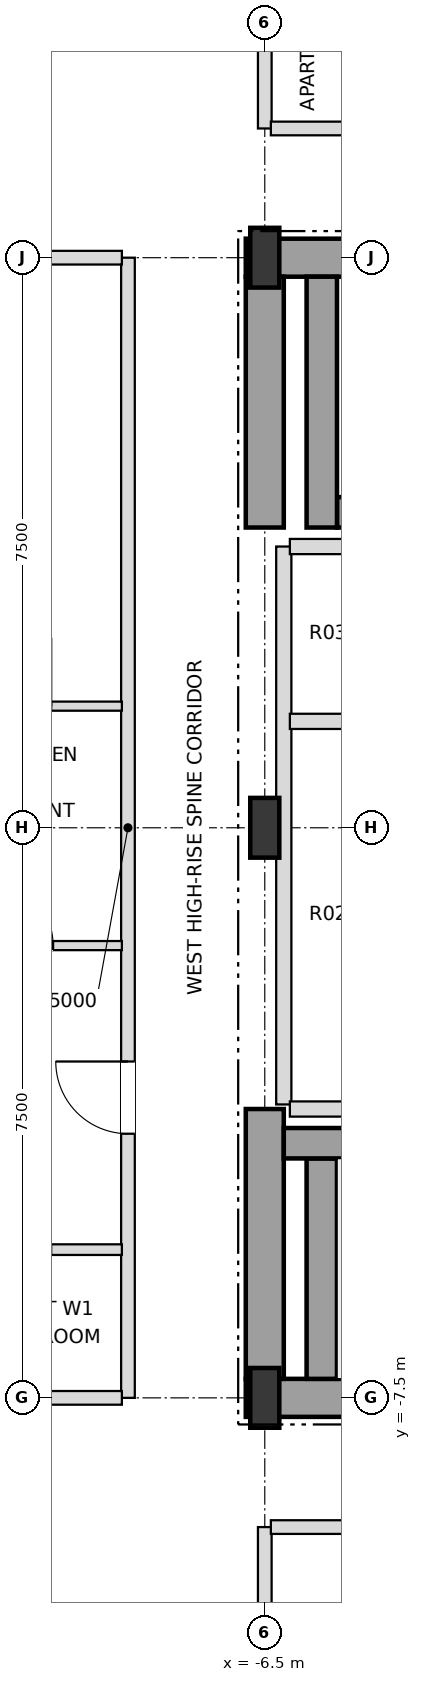
"""IFC4 building model, lengths in metres.
Left out: names, types, materials, properties, quantities, classifications, styles, units other than length and angle.
Written with IfcOpenShell. Run it as: python <this file> out.ifc"""

import sys

from ifc_helpers import new_model, si_unit, direction, frame, frame_2d, origin, origin_2d, place, context, subcontext, project, spatial, rectangle, i_section, extrude, element, fill, save


model = new_model("IFC4")
c1 = context("Model", 3, precision=1e-05, world=origin(), true_north=direction((0.0, 1.0)))
c2 = subcontext(c1, "Body", "Model", "MODEL_VIEW")
j1 = project(units=[si_unit("LENGTHUNIT", "METRE"), si_unit("PLANEANGLEUNIT", "RADIAN")], contexts=[c1])
p1 = place(None, origin())
s1 = spatial("IfcSite", under=j1, at=p1, CompositionType="ELEMENT")
p2 = place(p1, origin())
s2 = spatial("IfcBuilding", under=s1, at=p2, CompositionType="ELEMENT")
p3 = place(p2, frame((0.0, 0.0, 251.1)))
s3 = spatial("IfcBuildingStorey", under=s2, at=p3, CompositionType="ELEMENT", Elevation=251.1)
for number, where, z_axis, x_axis in (
    (1, (-6.5, -7.5, 0.0), (0.0, 0.0, 1.0), (1.0, 0.0, 0.0)),
    (2, (-6.5, 0.0, 0.0), (0.0, 0.0, 1.0), (1.0, 0.0, 0.0)),
    (3, (-6.5, 7.5, 0.0), (0.0, 0.0, 1.0), (1.0, 0.0, 0.0)),
):
    element("IfcColumn", number, at=place(p3, frame(where, z_axis=z_axis, x_axis=x_axis)), inside=s3, PredefinedType="COLUMN", context=c2, shape_type="SweptSolid", body=[
        extrude(i_section(OverallWidth=0.382, OverallDepth=0.786, WebThickness=0.02, FlangeThickness=0.033, at=origin_2d()), origin(), (0.0, 0.0, 1.0), 3.6),
    ])
p4 = place(p3, frame((-6.75, -7.5, 0.0), z_axis=(0.0, 0.0, 1.0), x_axis=(1.0, 0.0, 0.0)))
e4 = element("IfcWall", 4, at=p4, inside=s3, PredefinedType="SHEAR", context=c2, shape_type="SweptSolid", body=[
    extrude(rectangle(XDim=6.75, YDim=0.5, at=frame_2d((3.375, 0.0))), origin(), (0.0, 0.0, 1.0), 3.38),
])
p5 = place(p3, frame((-6.75, 7.5, 0.0), z_axis=(0.0, 0.0, 1.0), x_axis=(1.0, 0.0, 0.0)))
e5 = element("IfcWall", 5, at=p5, inside=s3, PredefinedType="SHEAR", context=c2, shape_type="SweptSolid", body=[
    extrude(rectangle(XDim=6.75, YDim=0.5, at=frame_2d((3.375, 0.0))), origin(), (0.0, 0.0, 1.0), 3.38),
])
p6 = place(p5, frame((1.65, 0.0, 0.0)))
e6 = element("IfcOpeningElement", 6, at=p6, cuts=e5, PredefinedType="OPENING", context=c2, shape_type="SweptSolid", body=[
    extrude(rectangle(XDim=1.05, YDim=2.15, at=frame_2d((0.525, 1.075))), frame((0.0, 0.26, 0.0), z_axis=(0.0, -1.0, 0.0), x_axis=(1.0, 0.0, 0.0)), (0.0, 0.0, 1.0), 0.52),
])
p7 = place(p3, frame((-6.5, -7.25, 0.0), z_axis=(0.0, 0.0, 1.0), x_axis=(0.0, 1.0, 0.0)))
e7 = element("IfcWall", 7, at=p7, inside=s3, PredefinedType="SHEAR", context=c2, shape_type="SweptSolid", body=[
    extrude(rectangle(XDim=3.55, YDim=0.5, at=frame_2d((1.775, 0.0))), origin(), (0.0, 0.0, 1.0), 3.38),
])
p8 = place(p3, frame((-6.5, 3.95, 0.0), z_axis=(0.0, 0.0, 1.0), x_axis=(0.0, 1.0, 0.0)))
e8 = element("IfcWall", 8, at=p8, inside=s3, PredefinedType="SHEAR", context=c2, shape_type="SweptSolid", body=[
    extrude(rectangle(XDim=3.3, YDim=0.5, at=frame_2d((1.65, 0.0))), origin(), (0.0, 0.0, 1.0), 3.38),
])
p9 = place(p3, frame((-5.75, -7.25, 0.0), z_axis=(0.0, 0.0, 1.0), x_axis=(0.0, 1.0, 0.0)))
e9 = element("IfcWall", 9, at=p9, inside=s3, PredefinedType="SHEAR", context=c2, shape_type="SweptSolid", body=[
    extrude(rectangle(XDim=2.9, YDim=0.4, at=frame_2d((1.45, 0.0))), origin(), (0.0, 0.0, 1.0), 3.38),
])
p10 = place(p3, frame((-6.25, -4.15, 0.0), z_axis=(0.0, 0.0, 1.0), x_axis=(1.0, 0.0, 0.0)))
e10 = element("IfcWall", 10, at=p10, inside=s3, PredefinedType="SHEAR", context=c2, shape_type="SweptSolid", body=[
    extrude(rectangle(XDim=7.78, YDim=0.4, at=frame_2d((3.89, 0.0))), origin(), (0.0, 0.0, 1.0), 3.38),
])
p11 = place(p3, frame((-5.55, 4.15, 0.0), z_axis=(0.0, 0.0, 1.0), x_axis=(1.0, 0.0, 0.0)))
e11 = element("IfcWall", 11, at=p11, inside=s3, PredefinedType="SHEAR", context=c2, shape_type="SweptSolid", body=[
    extrude(rectangle(XDim=7.08, YDim=0.4, at=frame_2d((3.54, 0.0))), origin(), (0.0, 0.0, 1.0), 3.38),
])
p12 = place(p3, frame((-5.75, 3.95, 0.0), z_axis=(0.0, 0.0, 1.0), x_axis=(0.0, 1.0, 0.0)))
e12 = element("IfcWall", 12, at=p12, inside=s3, PredefinedType="SHEAR", context=c2, shape_type="SweptSolid", body=[
    extrude(rectangle(XDim=3.3, YDim=0.4, at=frame_2d((1.65, 0.0))), origin(), (0.0, 0.0, 1.0), 3.38),
])
p13 = place(p3, frame((-8.3, -7.5, 0.0), z_axis=(0.0, 0.0, 1.0), x_axis=(0.0, 1.0, 0.0)))
e13 = element("IfcWall", 13, at=p13, inside=s3, PredefinedType="PARTITIONING", context=c2, shape_type="SweptSolid", body=[
    extrude(rectangle(XDim=15.0, YDim=0.18, at=frame_2d((7.5, 0.0))), origin(), (0.0, 0.0, 1.0), 3.38),
])
p14 = place(p13, frame((3.475, 0.0, 0.0)))
e14 = element("IfcOpeningElement", 14, at=p14, cuts=e13, PredefinedType="OPENING", context=c2, shape_type="SweptSolid", body=[
    extrude(rectangle(XDim=0.95, YDim=2.15, at=frame_2d((0.475, 1.075))), frame((0.0, 0.1, 0.0), z_axis=(0.0, -1.0, 0.0), x_axis=(1.0, 0.0, 0.0)), (0.0, 0.0, 1.0), 0.2),
])
for number, where, z_axis, x_axis in (
    (15, (-6.5, -19.9, 0.0), (0.0, 0.0, 1.0), (0.0, 1.0, 0.0)),
    (16, (-6.5, 9.2, 0.0), (0.0, 0.0, 1.0), (0.0, 1.0, 0.0)),
):
    element("IfcWall", number, at=place(p3, frame(where, z_axis=z_axis, x_axis=x_axis)), inside=s3, PredefinedType="PARTITIONING", context=c2, shape_type="SweptSolid", body=[
        extrude(rectangle(XDim=10.7, YDim=0.18, at=frame_2d((5.35, 0.0))), origin(), (0.0, 0.0, 1.0), 2.826),
    ])
p15 = place(p3, frame((-6.25, -3.64, 0.0), z_axis=(0.0, 0.0, 1.0), x_axis=(0.0, 1.0, 0.0)))
e17 = element("IfcWall", 17, at=p15, inside=s3, PredefinedType="SOLIDWALL", context=c2, shape_type="SweptSolid", body=[
    extrude(rectangle(XDim=7.34, YDim=0.2, at=frame_2d((3.67, 0.0))), origin(), (0.0, 0.0, 1.0), 3.38),
])
p16 = place(p3, frame((-6.42, -9.2, 0.0), z_axis=(0.0, 0.0, 1.0), x_axis=(1.0, 0.0, 0.0)))
e18 = element("IfcWall", 18, at=p16, inside=s3, PredefinedType="PARTITIONING", context=c2, shape_type="SweptSolid", body=[
    extrude(rectangle(XDim=5.19, YDim=0.18, at=frame_2d((2.595, 0.0))), origin(), (0.0, 0.0, 1.0), 3.38),
])
p17 = place(p16, frame((2.135, 0.0, 0.0)))
e19 = element("IfcOpeningElement", 19, at=p17, cuts=e18, PredefinedType="OPENING", context=c2, shape_type="SweptSolid", body=[
    extrude(rectangle(XDim=0.95, YDim=2.15, at=frame_2d((0.475, 1.075))), frame((0.0, 0.1, 0.0), z_axis=(0.0, -1.0, 0.0), x_axis=(1.0, 0.0, 0.0)), (0.0, 0.0, 1.0), 0.2),
])
p18 = place(p3, frame((-11.12, -7.5, 0.0), z_axis=(0.0, 0.0, 1.0), x_axis=(1.0, 0.0, 0.0)))
e20 = element("IfcWall", 20, at=p18, inside=s3, PredefinedType="PARTITIONING", context=c2, shape_type="SweptSolid", body=[
    extrude(rectangle(XDim=2.74, YDim=0.18, at=frame_2d((1.37, 0.0))), origin(), (0.0, 0.0, 1.0), 2.826),
])
p19 = place(p3, frame((-11.12, -5.55, 0.0), z_axis=(0.0, 0.0, 1.0), x_axis=(1.0, 0.0, 0.0)))
e21 = element("IfcWall", 21, at=p19, inside=s3, PredefinedType="PARTITIONING", context=c2, shape_type="SweptSolid", body=[
    extrude(rectangle(XDim=2.74, YDim=0.14, at=frame_2d((1.37, 0.0))), origin(), (0.0, 0.0, 1.0), 3.38),
])
p20 = place(p19, frame((0.91, 0.0, 0.0)))
e22 = element("IfcOpeningElement", 22, at=p20, cuts=e21, PredefinedType="OPENING", context=c2, shape_type="SweptSolid", body=[
    extrude(rectangle(XDim=0.9, YDim=2.1, at=frame_2d((0.45, 1.05))), frame((0.0, 0.08, 0.0), z_axis=(0.0, -1.0, 0.0), x_axis=(1.0, 0.0, 0.0)), (0.0, 0.0, 1.0), 0.16),
])
p21 = place(p3, frame((-6.17, -3.7, 0.0), z_axis=(0.0, 0.0, 1.0), x_axis=(1.0, 0.0, 0.0)))
e23 = element("IfcWall", 23, at=p21, inside=s3, PredefinedType="SOLIDWALL", context=c2, shape_type="SweptSolid", body=[
    extrude(rectangle(XDim=1.94, YDim=0.2, at=frame_2d((0.97, 0.0))), origin(), (0.0, 0.0, 1.0), 3.38),
])
p22 = place(p3, frame((-11.12, -1.55, 0.0), z_axis=(0.0, 0.0, 1.0), x_axis=(1.0, 0.0, 0.0)))
e24 = element("IfcWall", 24, at=p22, inside=s3, PredefinedType="PARTITIONING", context=c2, shape_type="SweptSolid", body=[
    extrude(rectangle(XDim=2.74, YDim=0.12, at=frame_2d((1.37, 0.0))), origin(), (0.0, 0.0, 1.0), 3.38),
])
p23 = place(p22, frame((0.885, 0.0, 0.0)))
e25 = element("IfcOpeningElement", 25, at=p23, cuts=e24, PredefinedType="OPENING", context=c2, shape_type="SweptSolid", body=[
    extrude(rectangle(XDim=0.95, YDim=2.1, at=frame_2d((0.475, 1.05))), frame((0.0, 0.07, 0.0), z_axis=(0.0, -1.0, 0.0), x_axis=(1.0, 0.0, 0.0)), (0.0, 0.0, 1.0), 0.14),
])
p24 = place(p3, frame((-6.17, 1.4, 0.0), z_axis=(0.0, 0.0, 1.0), x_axis=(1.0, 0.0, 0.0)))
e26 = element("IfcWall", 26, at=p24, inside=s3, PredefinedType="SOLIDWALL", context=c2, shape_type="SweptSolid", body=[
    extrude(rectangle(XDim=1.94, YDim=0.2, at=frame_2d((0.97, 0.0))), origin(), (0.0, 0.0, 1.0), 3.38),
])
p25 = place(p3, frame((-11.12, 1.6, 0.0), z_axis=(0.0, 0.0, 1.0), x_axis=(1.0, 0.0, 0.0)))
e27 = element("IfcWall", 27, at=p25, inside=s3, PredefinedType="PARTITIONING", context=c2, shape_type="SweptSolid", body=[
    extrude(rectangle(XDim=2.74, YDim=0.12, at=frame_2d((1.37, 0.0))), origin(), (0.0, 0.0, 1.0), 3.38),
])
p26 = place(p25, frame((0.91, 0.0, 0.0)))
e28 = element("IfcOpeningElement", 28, at=p26, cuts=e27, PredefinedType="OPENING", context=c2, shape_type="SweptSolid", body=[
    extrude(rectangle(XDim=0.9, YDim=2.1, at=frame_2d((0.45, 1.05))), frame((0.0, 0.07, 0.0), z_axis=(0.0, -1.0, 0.0), x_axis=(1.0, 0.0, 0.0)), (0.0, 0.0, 1.0), 0.14),
])
p27 = place(p3, frame((-6.17, 3.7, 0.0), z_axis=(0.0, 0.0, 1.0), x_axis=(1.0, 0.0, 0.0)))
e29 = element("IfcWall", 29, at=p27, inside=s3, PredefinedType="SOLIDWALL", context=c2, shape_type="SweptSolid", body=[
    extrude(rectangle(XDim=1.94, YDim=0.2, at=frame_2d((0.97, 0.0))), origin(), (0.0, 0.0, 1.0), 3.38),
])
p28 = place(p3, frame((-11.12, 7.5, 0.0), z_axis=(0.0, 0.0, 1.0), x_axis=(1.0, 0.0, 0.0)))
e30 = element("IfcWall", 30, at=p28, inside=s3, PredefinedType="PARTITIONING", context=c2, shape_type="SweptSolid", body=[
    extrude(rectangle(XDim=2.74, YDim=0.18, at=frame_2d((1.37, 0.0))), origin(), (0.0, 0.0, 1.0), 2.826),
])
p29 = place(p3, frame((-6.42, 9.2, 0.0), z_axis=(0.0, 0.0, 1.0), x_axis=(1.0, 0.0, 0.0)))
e31 = element("IfcWall", 31, at=p29, inside=s3, PredefinedType="PARTITIONING", context=c2, shape_type="SweptSolid", body=[
    extrude(rectangle(XDim=1.79, YDim=0.18, at=frame_2d((0.895, 0.0))), origin(), (0.0, 0.0, 1.0), 3.38),
])
p30 = place(p14, origin())
e32 = element("IfcDoor", 32, at=p30, inside=s3, OperationType="SINGLE_SWING_RIGHT", PredefinedType="DOOR", context=c2, shape_type="SweptSolid", body=[
    extrude(rectangle(XDim=0.95, YDim=2.15, at=frame_2d((0.475, 1.075))), frame((0.0, 0.025, 0.0), z_axis=(0.0, -1.0, 0.0), x_axis=(1.0, 0.0, 0.0)), (0.0, 0.0, 1.0), 0.05),
])
fill(e14, e32)
p31 = place(p23, origin())
e33 = element("IfcDoor", 33, at=p31, inside=s3, OperationType="SINGLE_SWING_LEFT", PredefinedType="DOOR", context=c2, shape_type="SweptSolid", body=[
    extrude(rectangle(XDim=0.95, YDim=2.1, at=frame_2d((0.475, 1.05))), frame((0.0, 0.025, 0.0), z_axis=(0.0, -1.0, 0.0), x_axis=(1.0, 0.0, 0.0)), (0.0, 0.0, 1.0), 0.05),
])
fill(e25, e33)
save(model, sys.argv[1])
